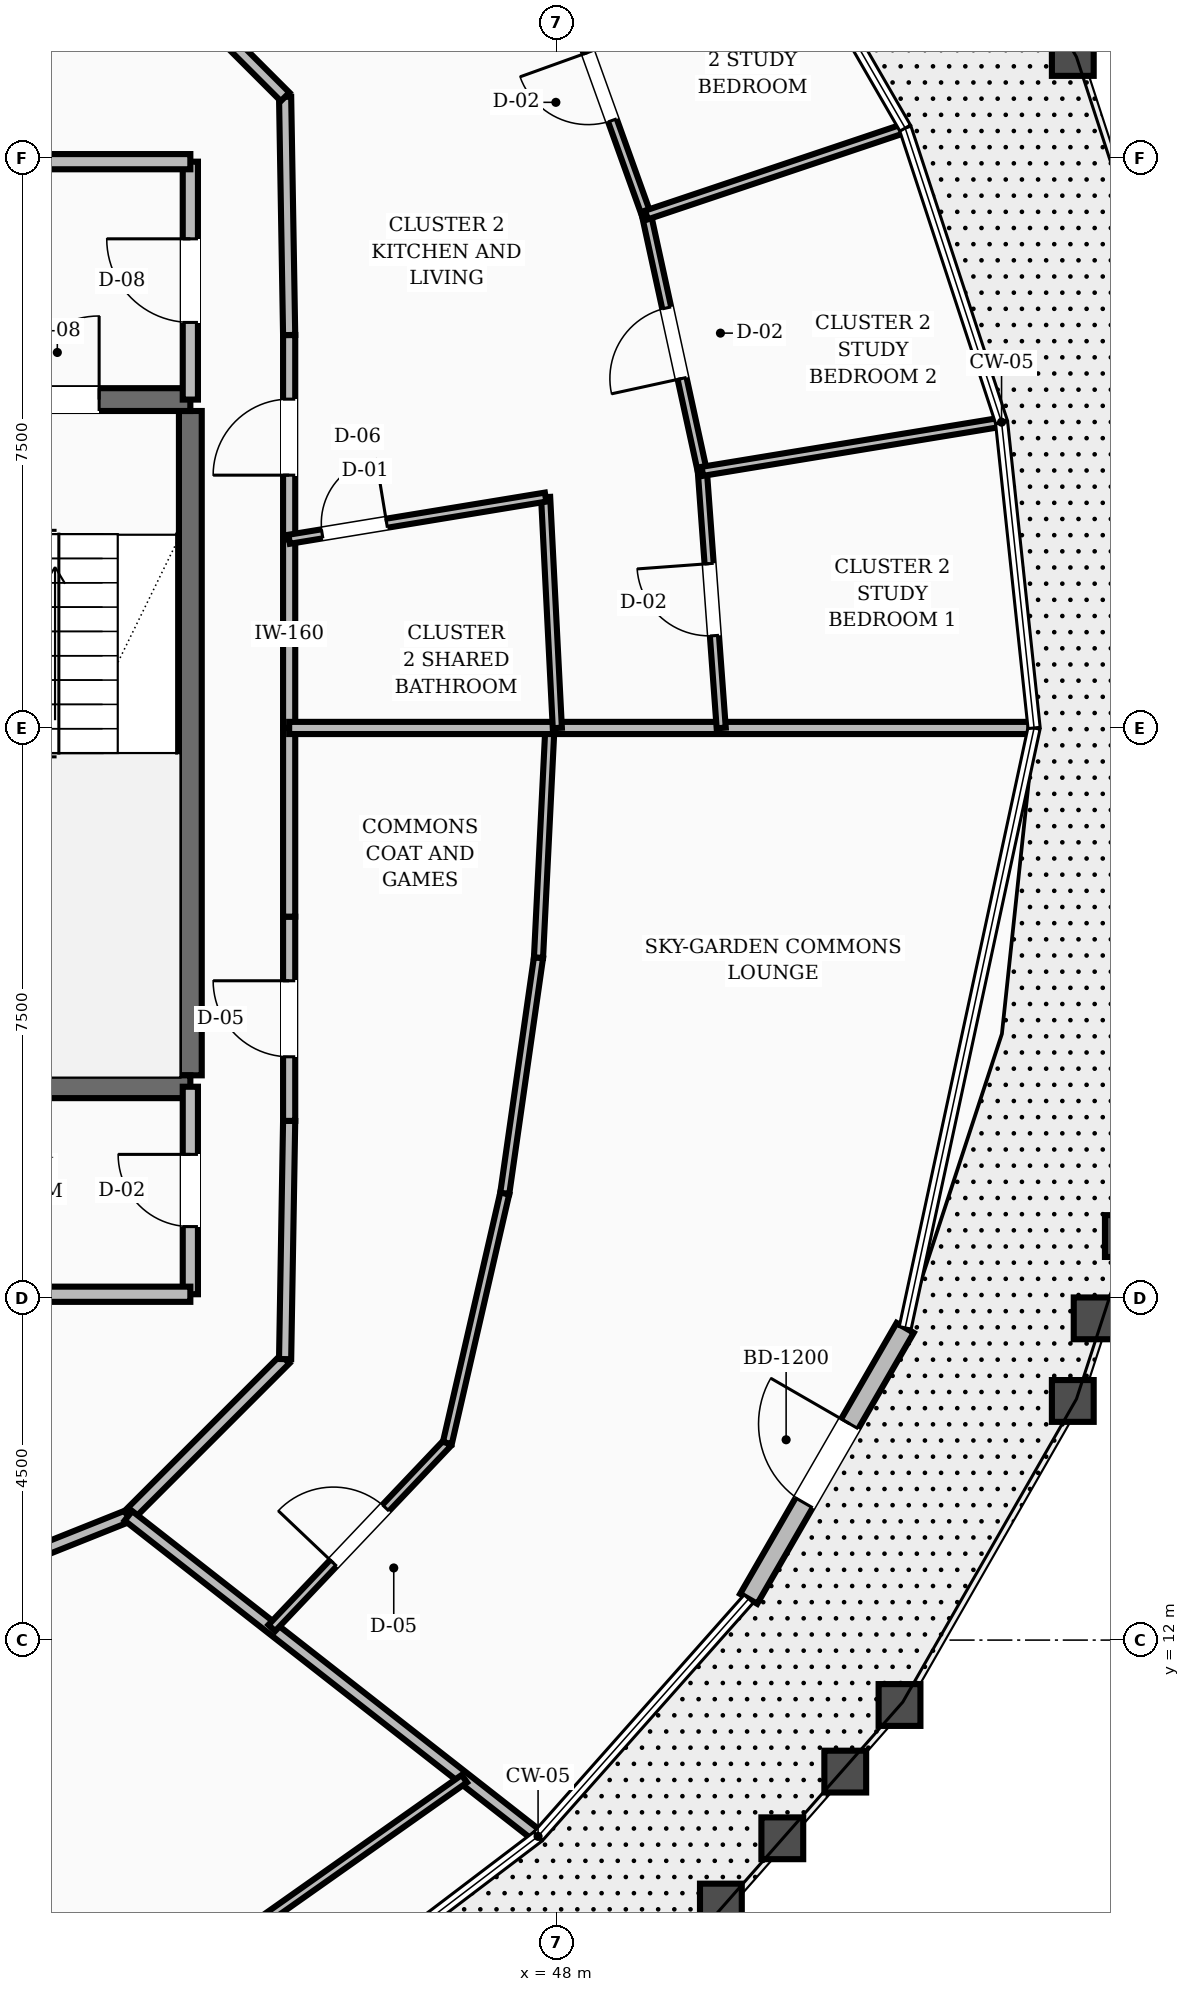
"""IFC4 building model, lengths in metres.
Left out: names, types, materials, properties, quantities, classifications, styles, units other than length and angle.
Written with IfcOpenShell. Run it as: python <this file> out.ifc"""

import sys

from ifc_helpers import new_model, si_unit, direction, frame, frame_2d, origin, place, context, subcontext, project, spatial, rectangle, extrude, element, fill, save


model = new_model("IFC4")
c1 = context("Model", 3, precision=1e-05, world=origin(), true_north=direction((0.0, 1.0)))
c2 = subcontext(c1, "Body", "Model", "MODEL_VIEW")
j1 = project(units=[si_unit("LENGTHUNIT", "METRE"), si_unit("PLANEANGLEUNIT", "RADIAN")], contexts=[c1])
p1 = place(None, origin())
s1 = spatial("IfcSite", under=j1, at=p1, CompositionType="ELEMENT")
p2 = place(p1, origin())
s2 = spatial("IfcBuilding", under=s1, at=p2, CompositionType="ELEMENT")
p3 = place(p2, frame((0.0, 0.0, 225.6)))
s3 = spatial("IfcBuildingStorey", under=s2, at=p3, CompositionType="ELEMENT", Elevation=225.6)
p4 = place(p3, frame((43.18, 19.43, 0.0), z_axis=(0.0, 0.0, 1.0), x_axis=(0.0, 1.0, 0.0)))
e1 = element("IfcWall", 1, at=p4, inside=s3, PredefinedType="SHEAR", context=c2, shape_type="SweptSolid", body=[
    extrude(rectangle(XDim=8.74, YDim=0.3, at=frame_2d((4.37, 0.0))), origin(), (0.0, 0.0, 1.0), 3.6),
])
p5 = place(p3, frame((39.58, 19.28, 0.0), z_axis=(0.0, 0.0, 1.0), x_axis=(1.0, 0.0, 0.0)))
e2 = element("IfcWall", 2, at=p5, inside=s3, PredefinedType="SHEAR", context=c2, shape_type="SweptSolid", body=[
    extrude(rectangle(XDim=3.6, YDim=0.3, at=frame_2d((1.8, 0.0))), origin(), (0.0, 0.0, 1.0), 3.6),
])
p6 = place(p3, frame((39.58, 28.32, 0.0), z_axis=(0.0, 0.0, 1.0), x_axis=(1.0, 0.0, 0.0)))
e3 = element("IfcWall", 3, at=p6, inside=s3, PredefinedType="SHEAR", context=c2, shape_type="SweptSolid", body=[
    extrude(rectangle(XDim=3.6, YDim=0.3, at=frame_2d((1.8, 0.0))), origin(), (0.0, 0.0, 1.0), 3.6),
])
p7 = place(p6, frame((1.3, 0.0, 0.0)))
e4 = element("IfcOpeningElement", 4, at=p7, cuts=e3, PredefinedType="OPENING", context=c2, shape_type="SweptSolid", body=[
    extrude(rectangle(XDim=1.1, YDim=2.1, at=frame_2d((0.55, 1.05))), frame((0.0, 0.16, 0.0), z_axis=(0.0, -1.0, 0.0), x_axis=(1.0, 0.0, 0.0)), (0.0, 0.0, 1.0), 0.32),
])
p8 = place(p3, frame((50.526, 12.543, 0.0), z_axis=(0.0, 0.0, 1.0), x_axis=(0.500105692171, 0.865964373781, 0.0)))
e5 = element("IfcWall", 5, at=p8, inside=s3, PredefinedType="STANDARD", context=c2, shape_type="SweptSolid", body=[
    extrude(rectangle(XDim=4.117, YDim=0.26, at=frame_2d((2.059, 0.0))), origin(), (0.0, 0.0, 1.0), 2.88),
])
p9 = place(p8, frame((1.458, 0.0, 0.0)))
e6 = element("IfcOpeningElement", 6, at=p9, cuts=e5, PredefinedType="OPENING", context=c2, shape_type="SweptSolid", body=[
    extrude(rectangle(XDim=1.2, YDim=2.15, at=frame_2d((0.6, 1.075))), frame((0.0, 0.14, 0.0), z_axis=(0.0, -1.0, 0.0), x_axis=(1.0, 0.0, 0.0)), (0.0, 0.0, 1.0), 0.28),
])
p10 = place(p3, frame((43.18, 28.32, 0.0), z_axis=(0.0, 0.0, 1.0), x_axis=(0.0, 1.0, 0.0)))
e7 = element("IfcWall", 7, at=p10, inside=s3, PredefinedType="SOLIDWALL", context=c2, shape_type="SweptSolid", body=[
    extrude(rectangle(XDim=3.13, YDim=0.2, at=frame_2d((1.565, 0.0))), origin(), (0.0, 0.0, 1.0), 2.87),
])
p11 = place(p10, frame((1.015, 0.0, 0.0)))
e8 = element("IfcOpeningElement", 8, at=p11, cuts=e7, PredefinedType="OPENING", context=c2, shape_type="SweptSolid", body=[
    extrude(rectangle(XDim=1.1, YDim=2.1, at=frame_2d((0.55, 1.05))), frame((0.0, 0.11, 0.0), z_axis=(0.0, -1.0, 0.0), x_axis=(1.0, 0.0, 0.0)), (0.0, 0.0, 1.0), 0.22),
])
p12 = place(p3, frame((39.2, 31.45, 0.0), z_axis=(0.0, 0.0, 1.0), x_axis=(1.0, 0.0, 0.0)))
e9 = element("IfcWall", 9, at=p12, inside=s3, PredefinedType="SOLIDWALL", context=c2, shape_type="SweptSolid", body=[
    extrude(rectangle(XDim=3.98, YDim=0.2, at=frame_2d((1.99, 0.0))), origin(), (0.0, 0.0, 1.0), 2.87),
])
p13 = place(p3, frame((43.18, 16.55, 0.0), z_axis=(0.0, 0.0, 1.0), x_axis=(0.0, 1.0, 0.0)))
e10 = element("IfcWall", 10, at=p13, inside=s3, PredefinedType="SOLIDWALL", context=c2, shape_type="SweptSolid", body=[
    extrude(rectangle(XDim=2.73, YDim=0.2, at=frame_2d((1.365, 0.0))), origin(), (0.0, 0.0, 1.0), 2.87),
])
p14 = place(p13, frame((0.89, 0.0, 0.0)))
e11 = element("IfcOpeningElement", 11, at=p14, cuts=e10, PredefinedType="OPENING", context=c2, shape_type="SweptSolid", body=[
    extrude(rectangle(XDim=0.95, YDim=2.1, at=frame_2d((0.475, 1.05))), frame((0.0, 0.11, 0.0), z_axis=(0.0, -1.0, 0.0), x_axis=(1.0, 0.0, 0.0)), (0.0, 0.0, 1.0), 0.22),
])
p15 = place(p3, frame((39.2, 16.55, 0.0), z_axis=(0.0, 0.0, 1.0), x_axis=(1.0, 0.0, 0.0)))
e12 = element("IfcWall", 12, at=p15, inside=s3, PredefinedType="SOLIDWALL", context=c2, shape_type="SweptSolid", body=[
    extrude(rectangle(XDim=3.98, YDim=0.2, at=frame_2d((1.99, 0.0))), origin(), (0.0, 0.0, 1.0), 2.87),
])
p16 = place(p3, frame((44.48, 24.0, 0.0), z_axis=(0.0, 0.0, 1.0), x_axis=(0.0, 1.0, 0.0)))
e13 = element("IfcWall", 13, at=p16, inside=s3, PredefinedType="SOLIDWALL", context=c2, shape_type="SweptSolid", body=[
    extrude(rectangle(XDim=2.482, YDim=0.16, at=frame_2d((1.241, 0.0))), origin(), (0.0, 0.0, 1.0), 2.87),
])
p17 = place(p3, frame((44.48, 26.482, 0.0), z_axis=(0.0, 0.0, 1.0), x_axis=(0.0, 1.0, 0.0)))
e14 = element("IfcWall", 14, at=p17, inside=s3, PredefinedType="SOLIDWALL", context=c2, shape_type="SweptSolid", body=[
    extrude(rectangle(XDim=2.687, YDim=0.16, at=frame_2d((1.344, 0.0))), origin(), (0.0, 0.0, 1.0), 2.87),
])
p18 = place(p17, frame((0.844, 0.0, 0.0)))
e15 = element("IfcOpeningElement", 15, at=p18, cuts=e14, PredefinedType="OPENING", context=c2, shape_type="SweptSolid", body=[
    extrude(rectangle(XDim=1.0, YDim=2.1, at=frame_2d((0.5, 1.05))), frame((0.0, 0.09, 0.0), z_axis=(0.0, -1.0, 0.0), x_axis=(1.0, 0.0, 0.0)), (0.0, 0.0, 1.0), 0.18),
])
p19 = place(p3, frame((44.48, 29.169, 0.0), z_axis=(0.0, 0.0, 1.0), x_axis=(-0.016981035134, 0.999855811828, 0.0)))
e16 = element("IfcWall", 16, at=p19, inside=s3, PredefinedType="SOLIDWALL", context=c2, shape_type="SweptSolid", body=[
    extrude(rectangle(XDim=3.134, YDim=0.16, at=frame_2d((1.567, 0.0))), origin(), (0.0, 0.0, 1.0), 2.87),
])
p20 = place(p3, frame((44.427, 32.303, 0.0), z_axis=(0.0, 0.0, 1.0), x_axis=(-0.707106781187, 0.707106781187, 0.0)))
e17 = element("IfcWall", 17, at=p20, inside=s3, PredefinedType="SOLIDWALL", context=c2, shape_type="SweptSolid", body=[
    extrude(rectangle(XDim=2.916, YDim=0.16, at=frame_2d((1.458, 0.0))), origin(), (0.0, 0.0, 1.0), 2.87),
])
p21 = place(p3, frame((39.651, 12.55, 0.0), z_axis=(0.0, 0.0, 1.0), x_axis=(0.92856882165, 0.371160266542, 0.0)))
e18 = element("IfcWall", 18, at=p21, inside=s3, PredefinedType="SOLIDWALL", context=c2, shape_type="SweptSolid", body=[
    extrude(rectangle(XDim=2.923, YDim=0.16, at=frame_2d((1.461, 0.0))), origin(), (0.0, 0.0, 1.0), 2.87),
])
p22 = place(p3, frame((42.365, 13.635, 0.0), z_axis=(0.0, 0.0, 1.0), x_axis=(0.707106781187, 0.707106781187, 0.0)))
e19 = element("IfcWall", 19, at=p22, inside=s3, PredefinedType="SOLIDWALL", context=c2, shape_type="SweptSolid", body=[
    extrude(rectangle(XDim=2.916, YDim=0.16, at=frame_2d((1.458, 0.0))), origin(), (0.0, 0.0, 1.0), 2.87),
])
p23 = place(p3, frame((44.427, 15.697, 0.0), z_axis=(0.0, 0.0, 1.0), x_axis=(0.016981035134, 0.999855811828, 0.0)))
e20 = element("IfcWall", 20, at=p23, inside=s3, PredefinedType="SOLIDWALL", context=c2, shape_type="SweptSolid", body=[
    extrude(rectangle(XDim=3.134, YDim=0.16, at=frame_2d((1.567, 0.0))), origin(), (0.0, 0.0, 1.0), 2.87),
])
p24 = place(p3, frame((44.48, 18.831, 0.0), z_axis=(0.0, 0.0, 1.0), x_axis=(0.0, 1.0, 0.0)))
e21 = element("IfcWall", 21, at=p24, inside=s3, PredefinedType="SOLIDWALL", context=c2, shape_type="SweptSolid", body=[
    extrude(rectangle(XDim=2.687, YDim=0.16, at=frame_2d((1.344, 0.0))), origin(), (0.0, 0.0, 1.0), 2.87),
])
p25 = place(p24, frame((0.844, 0.0, 0.0)))
e22 = element("IfcOpeningElement", 22, at=p25, cuts=e21, PredefinedType="OPENING", context=c2, shape_type="SweptSolid", body=[
    extrude(rectangle(XDim=1.0, YDim=2.1, at=frame_2d((0.5, 1.05))), frame((0.0, 0.09, 0.0), z_axis=(0.0, -1.0, 0.0), x_axis=(1.0, 0.0, 0.0)), (0.0, 0.0, 1.0), 0.18),
])
p26 = place(p3, frame((44.48, 21.518, 0.0), z_axis=(0.0, 0.0, 1.0), x_axis=(0.0, 1.0, 0.0)))
e23 = element("IfcWall", 23, at=p26, inside=s3, PredefinedType="SOLIDWALL", context=c2, shape_type="SweptSolid", body=[
    extrude(rectangle(XDim=2.482, YDim=0.16, at=frame_2d((1.241, 0.0))), origin(), (0.0, 0.0, 1.0), 2.87),
])
p27 = place(p3, frame((42.365, 13.635, 0.0), z_axis=(0.0, 0.0, 1.0), x_axis=(0.78755504873, -0.61624430644, 0.0)))
e24 = element("IfcWall", 24, at=p27, inside=s3, PredefinedType="SOLIDWALL", context=c2, shape_type="SweptSolid", body=[
    extrude(rectangle(XDim=6.794, YDim=0.16, at=frame_2d((3.397, 0.0))), origin(), (0.0, 0.0, 1.0), 2.87),
])
p28 = place(p3, frame((44.251, 12.159, 0.0), z_axis=(0.0, 0.0, 1.0), x_axis=(0.688384139407, 0.725346314951, 0.0)))
e25 = element("IfcWall", 25, at=p28, inside=s3, PredefinedType="PARTITIONING", context=c2, shape_type="SweptSolid", body=[
    extrude(rectangle(XDim=3.355, YDim=0.12, at=frame_2d((1.678, 0.0))), origin(), (0.0, 0.0, 1.0), 2.87),
])
p29 = place(p28, frame((1.178, 0.0, 0.0)))
e26 = element("IfcOpeningElement", 26, at=p29, cuts=e25, PredefinedType="OPENING", context=c2, shape_type="SweptSolid", body=[
    extrude(rectangle(XDim=1.0, YDim=2.1, at=frame_2d((0.5, 1.05))), frame((0.0, 0.07, 0.0), z_axis=(0.0, -1.0, 0.0), x_axis=(1.0, 0.0, 0.0)), (0.0, 0.0, 1.0), 0.14),
])
p30 = place(p3, frame((46.561, 14.593, 0.0), z_axis=(0.0, 0.0, 1.0), x_axis=(0.224102977653, 0.974565470047, 0.0)))
e27 = element("IfcWall", 27, at=p30, inside=s3, PredefinedType="PARTITIONING", context=c2, shape_type="SweptSolid", body=[
    extrude(rectangle(XDim=3.371, YDim=0.12, at=frame_2d((1.685, 0.0))), origin(), (0.0, 0.0, 1.0), 2.87),
])
p31 = place(p3, frame((47.317, 17.878, 0.0), z_axis=(0.0, 0.0, 1.0), x_axis=(0.141705072356, 0.9899089213, 0.0)))
e28 = element("IfcWall", 28, at=p31, inside=s3, PredefinedType="PARTITIONING", context=c2, shape_type="SweptSolid", body=[
    extrude(rectangle(XDim=3.132, YDim=0.12, at=frame_2d((1.566, 0.0))), origin(), (0.0, 0.0, 1.0), 2.87),
])
p32 = place(p3, frame((47.76, 20.978, 0.0), z_axis=(0.0, 0.0, 1.0), x_axis=(0.049466716378, 0.998775772619, 0.0)))
e29 = element("IfcWall", 29, at=p32, inside=s3, PredefinedType="PARTITIONING", context=c2, shape_type="SweptSolid", body=[
    extrude(rectangle(XDim=3.025, YDim=0.12, at=frame_2d((1.513, 0.0))), origin(), (0.0, 0.0, 1.0), 2.87),
])
p33 = place(p3, frame((44.48, 24.0, 0.0), z_axis=(0.0, 0.0, 1.0), x_axis=(1.0, 0.0, 0.0)))
e30 = element("IfcWall", 30, at=p33, inside=s3, PredefinedType="SOLIDWALL", context=c2, shape_type="SweptSolid", body=[
    extrude(rectangle(XDim=9.751, YDim=0.16, at=frame_2d((4.875, 0.0))), origin(), (0.0, 0.0, 1.0), 2.87),
])
p34 = place(p3, frame((48.008, 24.0, 0.0), z_axis=(0.0, 0.0, 1.0), x_axis=(-0.050738421971, 0.998711976766, 0.0)))
e31 = element("IfcWall", 31, at=p34, inside=s3, PredefinedType="PARTITIONING", context=c2, shape_type="SweptSolid", body=[
    extrude(rectangle(XDim=3.041, YDim=0.12, at=frame_2d((1.521, 0.0))), origin(), (0.0, 0.0, 1.0), 2.87),
])
p35 = place(p3, frame((44.48, 26.482, 0.0), z_axis=(0.0, 0.0, 1.0), x_axis=(0.986754313542, 0.162221837943, 0.0)))
e32 = element("IfcWall", 32, at=p35, inside=s3, PredefinedType="PARTITIONING", context=c2, shape_type="SweptSolid", body=[
    extrude(rectangle(XDim=3.419, YDim=0.12, at=frame_2d((1.71, 0.0))), origin(), (0.0, 0.0, 1.0), 2.87),
])
p36 = place(p35, frame((0.44, 0.0, 0.0)))
e33 = element("IfcOpeningElement", 33, at=p36, cuts=e32, PredefinedType="OPENING", context=c2, shape_type="SweptSolid", body=[
    extrude(rectangle(XDim=0.86, YDim=2.1, at=frame_2d((0.43, 1.05))), frame((0.0, 0.07, 0.0), z_axis=(0.0, -1.0, 0.0), x_axis=(1.0, 0.0, 0.0)), (0.0, 0.0, 1.0), 0.14),
])
p37 = place(p3, frame((50.164, 24.0, 0.0), z_axis=(0.0, 0.0, 1.0), x_axis=(-0.073343046292, 0.997306772042, 0.0)))
e34 = element("IfcWall", 34, at=p37, inside=s3, PredefinedType="PARTITIONING", context=c2, shape_type="SweptSolid", body=[
    extrude(rectangle(XDim=3.385, YDim=0.12, at=frame_2d((1.693, 0.0))), origin(), (0.0, 0.0, 1.0), 2.87),
])
p38 = place(p37, frame((1.218, 0.0, 0.0)))
e35 = element("IfcOpeningElement", 35, at=p38, cuts=e34, PredefinedType="OPENING", context=c2, shape_type="SweptSolid", body=[
    extrude(rectangle(XDim=0.95, YDim=2.1, at=frame_2d((0.475, 1.05))), frame((0.0, 0.07, 0.0), z_axis=(0.0, -1.0, 0.0), x_axis=(1.0, 0.0, 0.0)), (0.0, 0.0, 1.0), 0.14),
])
p39 = place(p3, frame((49.916, 27.376, 0.0), z_axis=(0.0, 0.0, 1.0), x_axis=(-0.213063946471, 0.977038256525, 0.0)))
e36 = element("IfcWall", 36, at=p39, inside=s3, PredefinedType="PARTITIONING", context=c2, shape_type="SweptSolid", body=[
    extrude(rectangle(XDim=3.451, YDim=0.12, at=frame_2d((1.726, 0.0))), origin(), (0.0, 0.0, 1.0), 2.87),
])
p40 = place(p39, frame((1.251, 0.0, 0.0)))
e37 = element("IfcOpeningElement", 37, at=p40, cuts=e36, PredefinedType="OPENING", context=c2, shape_type="SweptSolid", body=[
    extrude(rectangle(XDim=0.95, YDim=2.1, at=frame_2d((0.475, 1.05))), frame((0.0, 0.07, 0.0), z_axis=(0.0, -1.0, 0.0), x_axis=(1.0, 0.0, 0.0)), (0.0, 0.0, 1.0), 0.14),
])
p41 = place(p3, frame((49.916, 27.376, 0.0), z_axis=(0.0, 0.0, 1.0), x_axis=(0.98675994364, 0.162187587772, 0.0)))
e38 = element("IfcWall", 38, at=p41, inside=s3, PredefinedType="PARTITIONING", context=c2, shape_type="SweptSolid", body=[
    extrude(rectangle(XDim=3.939, YDim=0.12, at=frame_2d((1.97, 0.0))), origin(), (0.0, 0.0, 1.0), 2.87),
])
p42 = place(p3, frame((49.181, 30.748, 0.0), z_axis=(0.0, 0.0, 1.0), x_axis=(-0.33827951378, 0.941045679314, 0.0)))
e39 = element("IfcWall", 39, at=p42, inside=s3, PredefinedType="PARTITIONING", context=c2, shape_type="SweptSolid", body=[
    extrude(rectangle(XDim=3.596, YDim=0.12, at=frame_2d((1.798, 0.0))), origin(), (0.0, 0.0, 1.0), 2.87),
])
p43 = place(p42, frame((1.323, 0.0, 0.0)))
e40 = element("IfcOpeningElement", 40, at=p43, cuts=e39, PredefinedType="OPENING", context=c2, shape_type="SweptSolid", body=[
    extrude(rectangle(XDim=0.95, YDim=2.1, at=frame_2d((0.475, 1.05))), frame((0.0, 0.07, 0.0), z_axis=(0.0, -1.0, 0.0), x_axis=(1.0, 0.0, 0.0)), (0.0, 0.0, 1.0), 0.14),
])
p44 = place(p3, frame((49.181, 30.748, 0.0), z_axis=(0.0, 0.0, 1.0), x_axis=(0.947929060238, 0.318481548534, 0.0)))
e41 = element("IfcWall", 41, at=p44, inside=s3, PredefinedType="PARTITIONING", context=c2, shape_type="SweptSolid", body=[
    extrude(rectangle(XDim=3.541, YDim=0.12, at=frame_2d((1.771, 0.0))), origin(), (0.0, 0.0, 1.0), 2.87),
])
p45 = place(p3, frame((43.527, 7.878, 0.0), z_axis=(0.0, 0.0, 1.0), x_axis=(0.817051015381, 0.576565380738, 0.0)))
e42 = element("IfcWall", 42, at=p45, inside=s3, PredefinedType="PARTITIONING", context=c2, shape_type="SweptSolid", body=[
    extrude(rectangle(XDim=3.987, YDim=0.12, at=frame_2d((1.993, 0.0))), origin(), (0.0, 0.0, 1.0), 2.87),
])
p46 = place(p9, origin())
e43 = element("IfcDoor", 43, at=p46, inside=s3, OperationType="SINGLE_SWING_RIGHT", PredefinedType="DOOR", context=c2, shape_type="SweptSolid", body=[
    extrude(rectangle(XDim=1.2, YDim=2.15, at=frame_2d((0.6, 1.075))), frame((0.0, 0.025, 0.0), z_axis=(0.0, -1.0, 0.0), x_axis=(1.0, 0.0, 0.0)), (0.0, 0.0, 1.0), 0.05),
])
fill(e6, e43)
p47 = place(p7, origin())
e44 = element("IfcDoor", 44, at=p47, inside=s3, OperationType="SINGLE_SWING_RIGHT", PredefinedType="DOOR", context=c2, shape_type="SweptSolid", body=[
    extrude(rectangle(XDim=1.1, YDim=2.1, at=frame_2d((0.55, 1.05))), frame((0.0, 0.025, 0.0), z_axis=(0.0, -1.0, 0.0), x_axis=(1.0, 0.0, 0.0)), (0.0, 0.0, 1.0), 0.05),
])
fill(e4, e44)
p48 = place(p11, origin())
e45 = element("IfcDoor", 45, at=p48, inside=s3, OperationType="SINGLE_SWING_RIGHT", PredefinedType="DOOR", context=c2, shape_type="SweptSolid", body=[
    extrude(rectangle(XDim=1.1, YDim=2.1, at=frame_2d((0.55, 1.05))), frame((0.0, 0.025, 0.0), z_axis=(0.0, -1.0, 0.0), x_axis=(1.0, 0.0, 0.0)), (0.0, 0.0, 1.0), 0.05),
])
fill(e8, e45)
p49 = place(p14, origin())
e46 = element("IfcDoor", 46, at=p49, inside=s3, OperationType="SINGLE_SWING_RIGHT", PredefinedType="DOOR", context=c2, shape_type="SweptSolid", body=[
    extrude(rectangle(XDim=0.95, YDim=2.1, at=frame_2d((0.475, 1.05))), frame((0.0, 0.025, 0.0), z_axis=(0.0, -1.0, 0.0), x_axis=(1.0, 0.0, 0.0)), (0.0, 0.0, 1.0), 0.05),
])
fill(e11, e46)
p50 = place(p25, origin())
e47 = element("IfcDoor", 47, at=p50, inside=s3, OperationType="SINGLE_SWING_RIGHT", PredefinedType="DOOR", context=c2, shape_type="SweptSolid", body=[
    extrude(rectangle(XDim=1.0, YDim=2.1, at=frame_2d((0.5, 1.05))), frame((0.0, 0.025, 0.0), z_axis=(0.0, -1.0, 0.0), x_axis=(1.0, 0.0, 0.0)), (0.0, 0.0, 1.0), 0.05),
])
fill(e22, e47)
p51 = place(p29, origin())
e48 = element("IfcDoor", 48, at=p51, inside=s3, OperationType="SINGLE_SWING_LEFT", PredefinedType="DOOR", context=c2, shape_type="SweptSolid", body=[
    extrude(rectangle(XDim=1.0, YDim=2.1, at=frame_2d((0.5, 1.05))), frame((0.0, 0.025, 0.0), z_axis=(0.0, -1.0, 0.0), x_axis=(1.0, 0.0, 0.0)), (0.0, 0.0, 1.0), 0.05),
])
fill(e26, e48)
p52 = place(p36, origin())
e49 = element("IfcDoor", 49, at=p52, inside=s3, OperationType="SINGLE_SWING_RIGHT", PredefinedType="DOOR", context=c2, shape_type="SweptSolid", body=[
    extrude(rectangle(XDim=0.86, YDim=2.1, at=frame_2d((0.43, 1.05))), frame((0.0, 0.025, 0.0), z_axis=(0.0, -1.0, 0.0), x_axis=(1.0, 0.0, 0.0)), (0.0, 0.0, 1.0), 0.05),
])
fill(e33, e49)
p53 = place(p18, origin())
e50 = element("IfcDoor", 50, at=p53, inside=s3, OperationType="SINGLE_SWING_LEFT", PredefinedType="DOOR", context=c2, shape_type="SweptSolid", body=[
    extrude(rectangle(XDim=1.0, YDim=2.1, at=frame_2d((0.5, 1.05))), frame((0.0, 0.025, 0.0), z_axis=(0.0, -1.0, 0.0), x_axis=(1.0, 0.0, 0.0)), (0.0, 0.0, 1.0), 0.05),
])
fill(e15, e50)
p54 = place(p38, origin())
e51 = element("IfcDoor", 51, at=p54, inside=s3, OperationType="SINGLE_SWING_RIGHT", PredefinedType="DOOR", context=c2, shape_type="SweptSolid", body=[
    extrude(rectangle(XDim=0.95, YDim=2.1, at=frame_2d((0.475, 1.05))), frame((0.0, 0.025, 0.0), z_axis=(0.0, -1.0, 0.0), x_axis=(1.0, 0.0, 0.0)), (0.0, 0.0, 1.0), 0.05),
])
fill(e35, e51)
p55 = place(p40, origin())
e52 = element("IfcDoor", 52, at=p55, inside=s3, OperationType="SINGLE_SWING_LEFT", PredefinedType="DOOR", context=c2, shape_type="SweptSolid", body=[
    extrude(rectangle(XDim=0.95, YDim=2.1, at=frame_2d((0.475, 1.05))), frame((0.0, 0.025, 0.0), z_axis=(0.0, -1.0, 0.0), x_axis=(1.0, 0.0, 0.0)), (0.0, 0.0, 1.0), 0.05),
])
fill(e37, e52)
p56 = place(p43, origin())
e53 = element("IfcDoor", 53, at=p56, inside=s3, OperationType="SINGLE_SWING_RIGHT", PredefinedType="DOOR", context=c2, shape_type="SweptSolid", body=[
    extrude(rectangle(XDim=0.95, YDim=2.1, at=frame_2d((0.475, 1.05))), frame((0.0, 0.025, 0.0), z_axis=(0.0, -1.0, 0.0), x_axis=(1.0, 0.0, 0.0)), (0.0, 0.0, 1.0), 0.05),
])
fill(e40, e53)
save(model, sys.argv[1])
